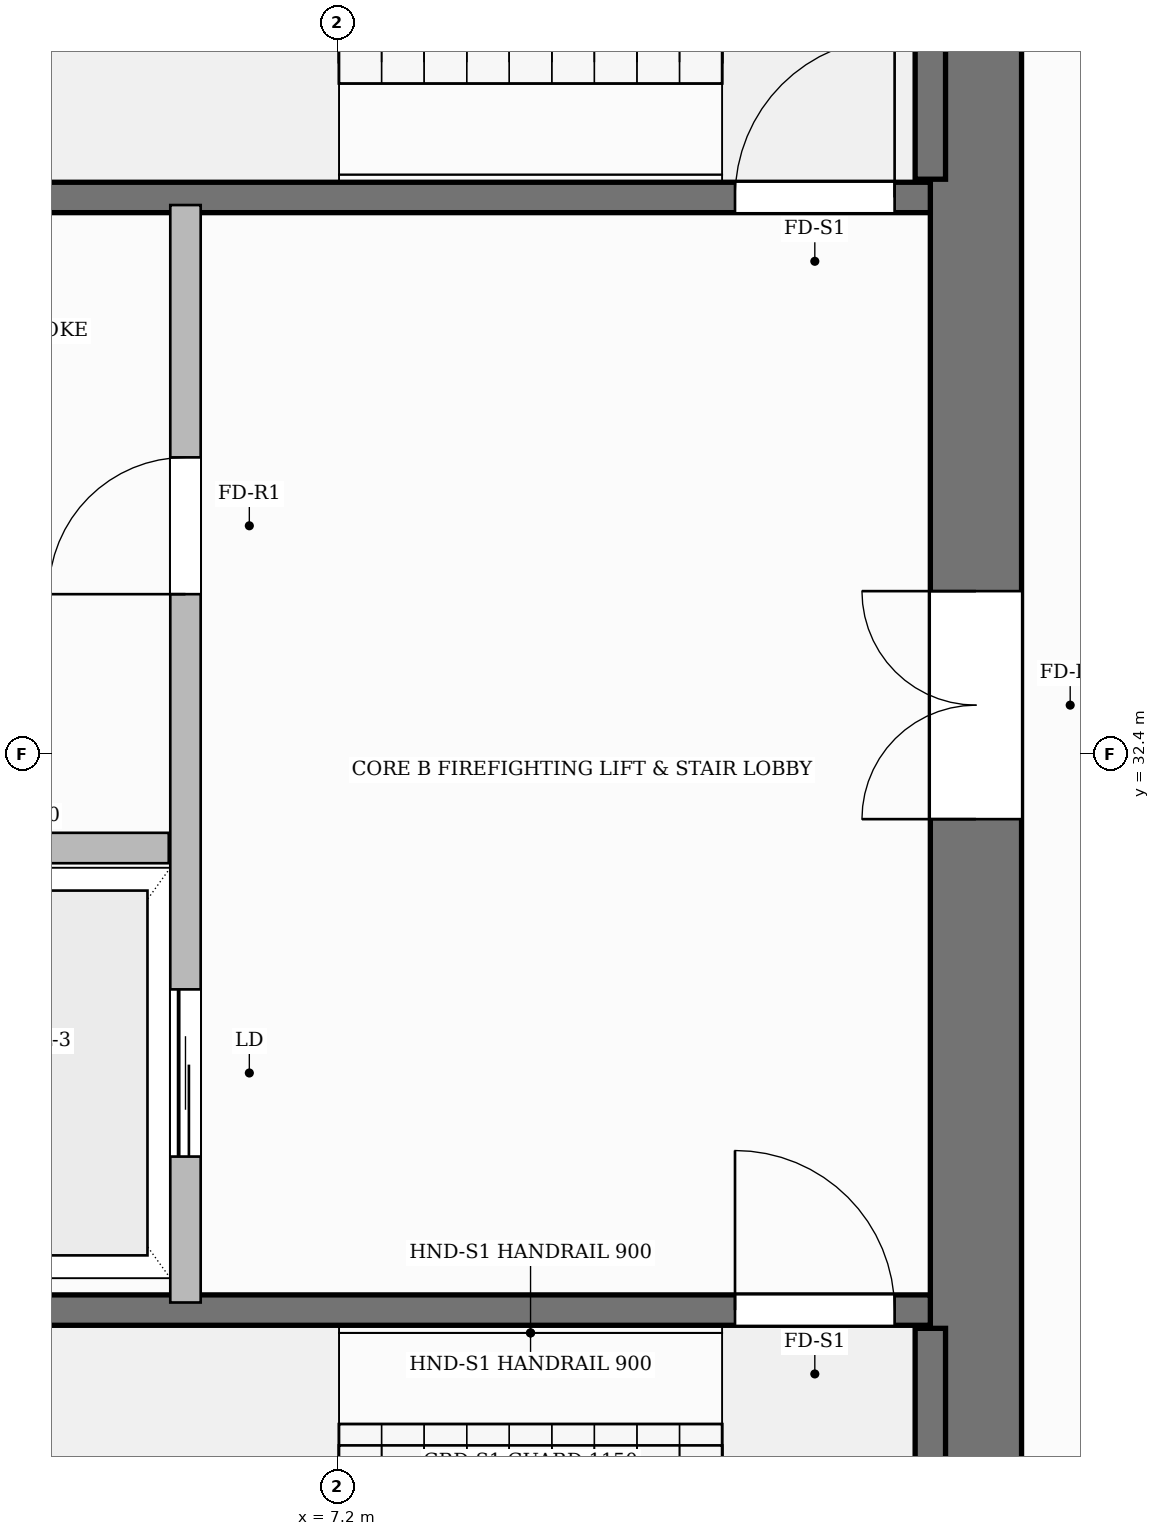
"""IFC4 building model, lengths in metres.
Left out: names, types, materials, properties, quantities, classifications, styles, units other than length and angle.
Written with IfcOpenShell. Run it as: python <this file> out.ifc"""

import sys

from ifc_helpers import new_model, si_unit, direction, frame, frame_2d, origin, place, context, subcontext, project, spatial, rectangle, extrude, source, transform, mapped, element, fill, save


model = new_model("IFC4")
c1 = context("Model", 3, precision=1e-05, world=origin(), true_north=direction((0.0, 1.0)))
c2 = subcontext(c1, "Body", "Model", "MODEL_VIEW")
j1 = project(units=[si_unit("LENGTHUNIT", "METRE"), si_unit("PLANEANGLEUNIT", "RADIAN")], contexts=[c1])
p1 = place(None, origin())
s1 = spatial("IfcSite", under=j1, at=p1, CompositionType="ELEMENT")
p2 = place(p1, origin())
s2 = spatial("IfcBuilding", under=s1, at=p2, CompositionType="ELEMENT")
p3 = place(p2, frame((0.0, 0.0, -13.0)))
s3 = spatial("IfcBuildingStorey", under=s2, at=p3, CompositionType="ELEMENT", Elevation=-13.0)
p4 = place(p3, frame((11.4, 25.5, -0.4), z_axis=(0.0, 0.0, 1.0), x_axis=(0.0, 1.0, 0.0)))
e1 = element("IfcWall", 1, at=p4, inside=s3, PredefinedType="SHEAR", context=c2, shape_type="SweptSolid", body=[
    extrude(rectangle(XDim=13.8, YDim=0.6, at=frame_2d((6.9, 0.0))), origin(), (0.0, 0.0, 1.0), 6.9),
])
p5 = place(p4, frame((6.47, 0.0, 0.4)))
e2 = element("IfcOpeningElement", 2, at=p5, cuts=e1, PredefinedType="OPENING", context=c2, shape_type="SweptSolid", body=[
    extrude(rectangle(XDim=1.5, YDim=2.2, at=frame_2d((0.75, 1.1))), frame((0.0, 0.31, 0.0), z_axis=(0.0, -1.0, 0.0), x_axis=(1.0, 0.0, 0.0)), (0.0, 0.0, 1.0), 0.62),
])
p6 = place(p3, frame((11.1, 25.92, -0.4), z_axis=(0.0, 0.0, 1.0), x_axis=(0.0, 1.0, 0.0)))
e3 = element("IfcWall", 3, at=p6, inside=s3, PredefinedType="SHEAR", context=c2, shape_type="SweptSolid", body=[
    extrude(rectangle(XDim=2.7, YDim=0.2, at=frame_2d((1.35, 0.0))), origin(), (0.0, 0.0, 1.0), 6.9),
])
p7 = place(p3, frame((4.0, 28.74, -0.4), z_axis=(0.0, 0.0, 1.0), x_axis=(1.0, 0.0, 0.0)))
e4 = element("IfcWall", 4, at=p7, inside=s3, PredefinedType="SHEAR", context=c2, shape_type="SweptSolid", body=[
    extrude(rectangle(XDim=7.1, YDim=0.2, at=frame_2d((3.55, 0.0))), origin(), (0.0, 0.0, 1.0), 6.9),
])
p8 = place(p7, frame((5.815, 0.0, 0.4)))
e5 = element("IfcOpeningElement", 5, at=p8, cuts=e4, PredefinedType="OPENING", context=c2, shape_type="SweptSolid", body=[
    extrude(rectangle(XDim=1.05, YDim=2.2, at=frame_2d((0.525, 1.1))), frame((0.0, 0.11, 0.0), z_axis=(0.0, -1.0, 0.0), x_axis=(1.0, 0.0, 0.0)), (0.0, 0.0, 1.0), 0.22),
])
p9 = place(p3, frame((11.1, 36.18, -0.4), z_axis=(0.0, 0.0, 1.0), x_axis=(0.0, 1.0, 0.0)))
e6 = element("IfcWall", 6, at=p9, inside=s3, PredefinedType="SHEAR", context=c2, shape_type="SweptSolid", body=[
    extrude(rectangle(XDim=2.7, YDim=0.2, at=frame_2d((1.35, 0.0))), origin(), (0.0, 0.0, 1.0), 6.9),
])
p10 = place(p3, frame((4.0, 36.06, -0.4), z_axis=(0.0, 0.0, 1.0), x_axis=(1.0, 0.0, 0.0)))
e7 = element("IfcWall", 7, at=p10, inside=s3, PredefinedType="SHEAR", context=c2, shape_type="SweptSolid", body=[
    extrude(rectangle(XDim=7.1, YDim=0.2, at=frame_2d((3.55, 0.0))), origin(), (0.0, 0.0, 1.0), 6.9),
])
p11 = place(p10, frame((5.815, 0.0, 0.4)))
e8 = element("IfcOpeningElement", 8, at=p11, cuts=e7, PredefinedType="OPENING", context=c2, shape_type="SweptSolid", body=[
    extrude(rectangle(XDim=1.05, YDim=2.2, at=frame_2d((0.525, 1.1))), frame((0.0, 0.11, 0.0), z_axis=(0.0, -1.0, 0.0), x_axis=(1.0, 0.0, 0.0)), (0.0, 0.0, 1.0), 0.22),
])
p12 = place(p3, frame((6.2, 28.79, 0.0), z_axis=(0.0, 0.0, 1.0), x_axis=(0.0, 1.0, 0.0)))
e9 = element("IfcWall", 9, at=p12, inside=s3, PredefinedType="PARTITIONING", context=c2, shape_type="SweptSolid", body=[
    extrude(rectangle(XDim=7.22, YDim=0.2, at=frame_2d((3.61, 0.0))), origin(), (0.0, 0.0, 1.0), 6.1),
])
p13 = place(p12, frame((4.66, 0.0, 0.0)))
e10 = element("IfcOpeningElement", 10, at=p13, cuts=e9, PredefinedType="OPENING", context=c2, shape_type="SweptSolid", body=[
    extrude(rectangle(XDim=0.9, YDim=2.1, at=frame_2d((0.45, 1.05))), frame((0.0, 0.11, 0.0), z_axis=(0.0, -1.0, 0.0), x_axis=(1.0, 0.0, 0.0)), (0.0, 0.0, 1.0), 0.22),
])
p14 = place(p12, frame((0.96, 0.0, 0.0)))
e11 = element("IfcOpeningElement", 11, at=p14, cuts=e9, PredefinedType="OPENING", context=c2, shape_type="SweptSolid", body=[
    extrude(rectangle(XDim=1.1, YDim=2.2, at=frame_2d((0.55, 1.1))), frame((0.0, 0.11, 0.0), z_axis=(0.0, -1.0, 0.0), x_axis=(1.0, 0.0, 0.0)), (0.0, 0.0, 1.0), 0.22),
])
p15 = place(p3, frame((3.96, 31.78, 0.0), z_axis=(0.0, 0.0, 1.0), x_axis=(1.0, 0.0, 0.0)))
e12 = element("IfcWall", 12, at=p15, inside=s3, PredefinedType="PARTITIONING", context=c2, shape_type="SweptSolid", body=[
    extrude(rectangle(XDim=2.13, YDim=0.2, at=frame_2d((1.065, 0.0))), origin(), (0.0, 0.0, 1.0), 6.1),
])
m1 = source(origin(), c2, "Body", "SweptSolid", [
    extrude(rectangle(XDim=1.05, YDim=2.2, at=frame_2d((0.525, 1.1))), frame((0.0, 0.025, 0.0), z_axis=(0.0, -1.0, 0.0), x_axis=(1.0, 0.0, 0.0)), (0.0, 0.0, 1.0), 0.05),
])
p16 = place(p8, origin())
e13 = element("IfcDoor", 13, at=p16, inside=s3, OperationType="SINGLE_SWING_LEFT", PredefinedType="DOOR", context=c2, shape_type="MappedRepresentation", body=[
    mapped(m1, transform((0.0, 0.0, 0.0), scale=1.0)),
])
fill(e5, e13)
p17 = place(p11, origin())
e14 = element("IfcDoor", 14, at=p17, inside=s3, OperationType="SINGLE_SWING_RIGHT", PredefinedType="DOOR", context=c2, shape_type="MappedRepresentation", body=[
    mapped(m1, transform((0.0, 0.0, 0.0), scale=1.0)),
])
fill(e8, e14)
m2 = source(origin(), c2, "Body", "SweptSolid", [
    extrude(rectangle(XDim=0.9, YDim=2.1, at=frame_2d((0.45, 1.05))), frame((0.0, 0.025, 0.0), z_axis=(0.0, -1.0, 0.0), x_axis=(1.0, 0.0, 0.0)), (0.0, 0.0, 1.0), 0.05),
])
p18 = place(p13, origin())
e15 = element("IfcDoor", 15, at=p18, inside=s3, OperationType="SINGLE_SWING_LEFT", PredefinedType="DOOR", context=c2, shape_type="MappedRepresentation", body=[
    mapped(m2, transform((0.0, 0.0, 0.0), scale=1.0)),
])
fill(e10, e15)
m3 = source(origin(), c2, "Body", "SweptSolid", [
    extrude(rectangle(XDim=1.5, YDim=2.2, at=frame_2d((0.75, 1.1))), frame((0.0, 0.025, 0.0), z_axis=(0.0, -1.0, 0.0), x_axis=(1.0, 0.0, 0.0)), (0.0, 0.0, 1.0), 0.05),
])
p19 = place(p5, origin())
e16 = element("IfcDoor", 16, at=p19, inside=s3, OperationType="DOUBLE_DOOR_SINGLE_SWING", PredefinedType="DOOR", context=c2, shape_type="MappedRepresentation", body=[
    mapped(m3, transform((0.0, 0.0, 0.0), scale=1.0)),
])
fill(e2, e16)
m4 = source(origin(), c2, "Body", "SweptSolid", [
    extrude(rectangle(XDim=1.1, YDim=2.2, at=frame_2d((0.55, 1.1))), frame((0.0, 0.025, 0.0), z_axis=(0.0, -1.0, 0.0), x_axis=(1.0, 0.0, 0.0)), (0.0, 0.0, 1.0), 0.05),
])
p20 = place(p14, origin())
e17 = element("IfcDoor", 17, at=p20, inside=s3, OperationType="SLIDING_TO_LEFT", PredefinedType="DOOR", context=c2, shape_type="MappedRepresentation", body=[
    mapped(m4, transform((0.0, 0.0, 0.0), scale=1.0)),
])
fill(e11, e17)
save(model, sys.argv[1])
